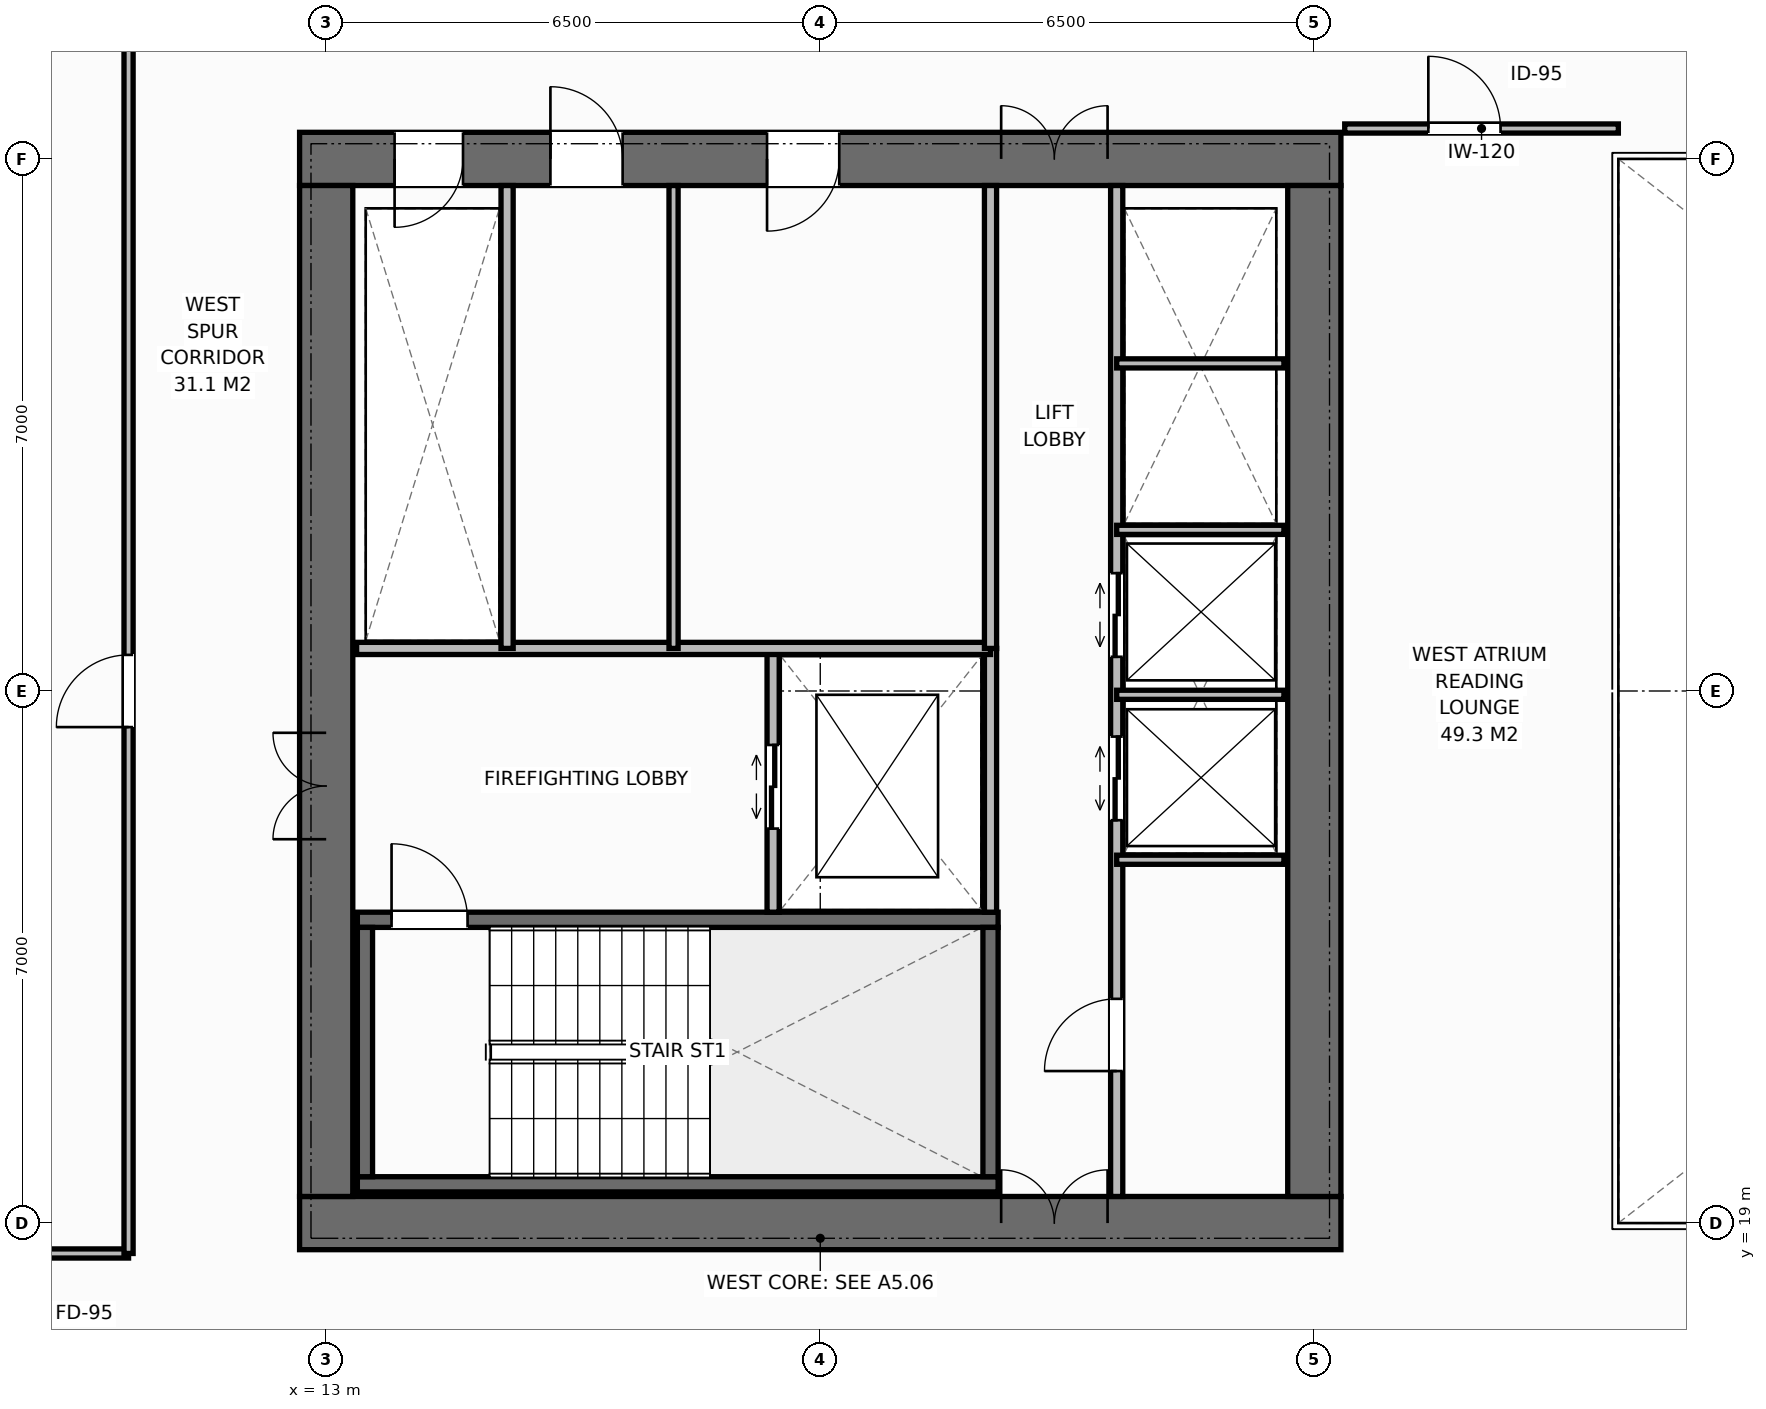
"""IFC4 building model, lengths in metres.
Left out: names, types, materials, properties, quantities, classifications, styles, units other than length and angle.
Written with IfcOpenShell. Run it as: python <this file> out.ifc"""

import sys

from ifc_helpers import new_model, si_unit, direction, frame, frame_2d, origin, place, context, subcontext, project, spatial, rectangle, extrude, element, fill, save


model = new_model("IFC4")
c1 = context("Model", 3, precision=1e-05, world=origin(), true_north=direction((0.0, 1.0)))
c2 = subcontext(c1, "Body", "Model", "MODEL_VIEW")
j1 = project(units=[si_unit("LENGTHUNIT", "METRE"), si_unit("PLANEANGLEUNIT", "RADIAN")], contexts=[c1])
p1 = place(None, origin())
s1 = spatial("IfcSite", under=j1, at=p1, CompositionType="ELEMENT")
p2 = place(p1, origin())
s2 = spatial("IfcBuilding", under=s1, at=p2, CompositionType="ELEMENT")
p3 = place(p2, frame((0.0, 0.0, 93.6)))
s3 = spatial("IfcBuildingStorey", under=s2, at=p3, CompositionType="ELEMENT", Elevation=93.6)
p4 = place(p3, frame((12.65, 19.0, 0.0), z_axis=(0.0, 0.0, 1.0), x_axis=(1.0, 0.0, 0.0)))
e1 = element("IfcWall", 1, at=p4, inside=s3, PredefinedType="SHEAR", context=c2, shape_type="SweptSolid", body=[
    extrude(rectangle(XDim=13.7, YDim=0.7, at=frame_2d((6.85, 0.0))), origin(), (0.0, 0.0, 1.0), 3.8),
])
p5 = place(p4, frame((9.23, 0.0, 0.0)))
e2 = element("IfcOpeningElement", 2, at=p5, cuts=e1, PredefinedType="OPENING", context=c2, shape_type="SweptSolid", body=[
    extrude(rectangle(XDim=1.4, YDim=2.2, at=frame_2d((0.7, 1.1))), frame((0.0, 0.36, 0.0), z_axis=(0.0, -1.0, 0.0), x_axis=(1.0, 0.0, 0.0)), (0.0, 0.0, 1.0), 0.72),
])
p6 = place(p3, frame((12.65, 33.0, 0.0), z_axis=(0.0, 0.0, 1.0), x_axis=(1.0, 0.0, 0.0)))
e3 = element("IfcWall", 3, at=p6, inside=s3, PredefinedType="SHEAR", context=c2, shape_type="SweptSolid", body=[
    extrude(rectangle(XDim=13.7, YDim=0.7, at=frame_2d((6.85, 0.0))), origin(), (0.0, 0.0, 1.0), 3.8),
])
p7 = place(p6, frame((1.25, 0.0, 0.0)))
e4 = element("IfcOpeningElement", 4, at=p7, cuts=e3, PredefinedType="OPENING", context=c2, shape_type="SweptSolid", body=[
    extrude(rectangle(XDim=0.9, YDim=2.15, at=frame_2d((0.45, 1.075))), frame((0.0, 0.36, 0.0), z_axis=(0.0, -1.0, 0.0), x_axis=(1.0, 0.0, 0.0)), (0.0, 0.0, 1.0), 0.72),
])
p8 = place(p6, frame((3.3, 0.0, 0.0)))
e5 = element("IfcOpeningElement", 5, at=p8, cuts=e3, PredefinedType="OPENING", context=c2, shape_type="SweptSolid", body=[
    extrude(rectangle(XDim=0.95, YDim=2.15, at=frame_2d((0.475, 1.075))), frame((0.0, 0.36, 0.0), z_axis=(0.0, -1.0, 0.0), x_axis=(1.0, 0.0, 0.0)), (0.0, 0.0, 1.0), 0.72),
])
p9 = place(p6, frame((6.15, 0.0, 0.0)))
e6 = element("IfcOpeningElement", 6, at=p9, cuts=e3, PredefinedType="OPENING", context=c2, shape_type="SweptSolid", body=[
    extrude(rectangle(XDim=0.95, YDim=2.15, at=frame_2d((0.475, 1.075))), frame((0.0, 0.36, 0.0), z_axis=(0.0, -1.0, 0.0), x_axis=(1.0, 0.0, 0.0)), (0.0, 0.0, 1.0), 0.72),
])
p10 = place(p6, frame((9.23, 0.0, 0.0)))
e7 = element("IfcOpeningElement", 7, at=p10, cuts=e3, PredefinedType="OPENING", context=c2, shape_type="SweptSolid", body=[
    extrude(rectangle(XDim=1.4, YDim=2.2, at=frame_2d((0.7, 1.1))), frame((0.0, 0.36, 0.0), z_axis=(0.0, -1.0, 0.0), x_axis=(1.0, 0.0, 0.0)), (0.0, 0.0, 1.0), 0.72),
])
p11 = place(p3, frame((13.0, 19.35, 0.0), z_axis=(0.0, 0.0, 1.0), x_axis=(0.0, 1.0, 0.0)))
e8 = element("IfcWall", 8, at=p11, inside=s3, PredefinedType="SHEAR", context=c2, shape_type="SweptSolid", body=[
    extrude(rectangle(XDim=13.3, YDim=0.7, at=frame_2d((6.65, 0.0))), origin(), (0.0, 0.0, 1.0), 3.8),
])
p12 = place(p11, frame((4.7, 0.0, 0.0)))
e9 = element("IfcOpeningElement", 9, at=p12, cuts=e8, PredefinedType="OPENING", context=c2, shape_type="SweptSolid", body=[
    extrude(rectangle(XDim=1.4, YDim=2.2, at=frame_2d((0.7, 1.1))), frame((0.0, 0.36, 0.0), z_axis=(0.0, -1.0, 0.0), x_axis=(1.0, 0.0, 0.0)), (0.0, 0.0, 1.0), 0.72),
])
p13 = place(p3, frame((26.0, 19.35, 0.0), z_axis=(0.0, 0.0, 1.0), x_axis=(0.0, 1.0, 0.0)))
e10 = element("IfcWall", 10, at=p13, inside=s3, PredefinedType="SHEAR", context=c2, shape_type="SweptSolid", body=[
    extrude(rectangle(XDim=13.3, YDim=0.7, at=frame_2d((6.65, 0.0))), origin(), (0.0, 0.0, 1.0), 3.8),
])
p14 = place(p3, frame((13.41, 19.51, 0.0), z_axis=(0.0, 0.0, 1.0), x_axis=(1.0, 0.0, 0.0)))
e11 = element("IfcWall", 11, at=p14, inside=s3, PredefinedType="SHEAR", context=c2, shape_type="SweptSolid", body=[
    extrude(rectangle(XDim=8.43, YDim=0.2, at=frame_2d((4.215, 0.0))), origin(), (0.0, 0.0, 1.0), 3.8),
])
p15 = place(p3, frame((13.41, 22.99, 0.0), z_axis=(0.0, 0.0, 1.0), x_axis=(1.0, 0.0, 0.0)))
e12 = element("IfcWall", 12, at=p15, inside=s3, PredefinedType="SHEAR", context=c2, shape_type="SweptSolid", body=[
    extrude(rectangle(XDim=8.43, YDim=0.2, at=frame_2d((4.215, 0.0))), origin(), (0.0, 0.0, 1.0), 3.8),
])
p16 = place(p15, frame((0.45, 0.0, 0.0)))
e13 = element("IfcOpeningElement", 13, at=p16, cuts=e12, PredefinedType="OPENING", context=c2, shape_type="SweptSolid", body=[
    extrude(rectangle(XDim=1.0, YDim=2.15, at=frame_2d((0.5, 1.075))), frame((0.0, 0.11, 0.0), z_axis=(0.0, -1.0, 0.0), x_axis=(1.0, 0.0, 0.0)), (0.0, 0.0, 1.0), 0.22),
])
for number, where, z_axis, x_axis in (
    (14, (13.51, 19.61, 0.0), (0.0, 0.0, 1.0), (0.0, 1.0, 0.0)),
    (15, (21.74, 19.61, 0.0), (0.0, 0.0, 1.0), (0.0, 1.0, 0.0)),
):
    element("IfcWall", number, at=place(p3, frame(where, z_axis=z_axis, x_axis=x_axis)), inside=s3, PredefinedType="SHEAR", context=c2, shape_type="SweptSolid", body=[
        extrude(rectangle(XDim=3.28, YDim=0.2, at=frame_2d((1.64, 0.0))), origin(), (0.0, 0.0, 1.0), 3.8),
    ])
p17 = place(p3, frame((21.74, 23.09, 0.0), z_axis=(0.0, 0.0, 1.0), x_axis=(0.0, 1.0, 0.0)))
e16 = element("IfcWall", 16, at=p17, inside=s3, PredefinedType="STANDARD", context=c2, shape_type="SweptSolid", body=[
    extrude(rectangle(XDim=3.47, YDim=0.16, at=frame_2d((1.735, 0.0))), origin(), (0.0, 0.0, 1.0), 3.565),
])
p18 = place(p3, frame((18.88, 23.09, 0.0), z_axis=(0.0, 0.0, 1.0), x_axis=(0.0, 1.0, 0.0)))
e17 = element("IfcWall", 17, at=p18, inside=s3, PredefinedType="STANDARD", context=c2, shape_type="SweptSolid", body=[
    extrude(rectangle(XDim=3.47, YDim=0.16, at=frame_2d((1.735, 0.0))), origin(), (0.0, 0.0, 1.0), 3.565),
])
p19 = place(p18, frame((1.1, 0.0, 0.0)))
e18 = element("IfcOpeningElement", 18, at=p19, cuts=e17, PredefinedType="OPENING", context=c2, shape_type="SweptSolid", body=[
    extrude(rectangle(XDim=1.1, YDim=2.2, at=frame_2d((0.55, 1.1))), frame((0.0, 0.09, 0.0), z_axis=(0.0, -1.0, 0.0), x_axis=(1.0, 0.0, 0.0)), (0.0, 0.0, 1.0), 0.18),
])
p20 = place(p3, frame((13.4, 26.56, 0.0), z_axis=(0.0, 0.0, 1.0), x_axis=(1.0, 0.0, 0.0)))
e19 = element("IfcWall", 19, at=p20, inside=s3, PredefinedType="STANDARD", context=c2, shape_type="SweptSolid", body=[
    extrude(rectangle(XDim=8.34, YDim=0.16, at=frame_2d((4.17, 0.0))), origin(), (0.0, 0.0, 1.0), 3.565),
])
p21 = place(p3, frame((15.38, 26.56, 0.0), z_axis=(0.0, 0.0, 1.0), x_axis=(0.0, 1.0, 0.0)))
e20 = element("IfcWall", 20, at=p21, inside=s3, PredefinedType="STANDARD", context=c2, shape_type="SweptSolid", body=[
    extrude(rectangle(XDim=6.09, YDim=0.16, at=frame_2d((3.045, 0.0))), origin(), (0.0, 0.0, 1.0), 3.565),
])
p22 = place(p3, frame((17.57, 26.56, 0.0), z_axis=(0.0, 0.0, 1.0), x_axis=(0.0, 1.0, 0.0)))
e21 = element("IfcWall", 21, at=p22, inside=s3, PredefinedType="PARTITIONING", context=c2, shape_type="SweptSolid", body=[
    extrude(rectangle(XDim=6.09, YDim=0.12, at=frame_2d((3.045, 0.0))), origin(), (0.0, 0.0, 1.0), 3.565),
])
p23 = place(p3, frame((21.74, 26.56, 0.0), z_axis=(0.0, 0.0, 1.0), x_axis=(0.0, 1.0, 0.0)))
e22 = element("IfcWall", 22, at=p23, inside=s3, PredefinedType="STANDARD", context=c2, shape_type="SweptSolid", body=[
    extrude(rectangle(XDim=6.09, YDim=0.16, at=frame_2d((3.045, 0.0))), origin(), (0.0, 0.0, 1.0), 3.565),
])
p24 = place(p3, frame((23.4, 19.35, 0.0), z_axis=(0.0, 0.0, 1.0), x_axis=(0.0, 1.0, 0.0)))
e23 = element("IfcWall", 23, at=p24, inside=s3, PredefinedType="STANDARD", context=c2, shape_type="SweptSolid", body=[
    extrude(rectangle(XDim=13.3, YDim=0.16, at=frame_2d((6.65, 0.0))), origin(), (0.0, 0.0, 1.0), 3.565),
])
p25 = place(p24, frame((1.65, 0.0, 0.0)))
e24 = element("IfcOpeningElement", 24, at=p25, cuts=e23, PredefinedType="OPENING", context=c2, shape_type="SweptSolid", body=[
    extrude(rectangle(XDim=0.95, YDim=2.15, at=frame_2d((0.475, 1.075))), frame((0.0, 0.09, 0.0), z_axis=(0.0, -1.0, 0.0), x_axis=(1.0, 0.0, 0.0)), (0.0, 0.0, 1.0), 0.18),
])
p26 = place(p24, frame((4.95, 0.0, 0.0)))
e25 = element("IfcOpeningElement", 25, at=p26, cuts=e23, PredefinedType="OPENING", context=c2, shape_type="SweptSolid", body=[
    extrude(rectangle(XDim=1.1, YDim=2.2, at=frame_2d((0.55, 1.1))), frame((0.0, 0.09, 0.0), z_axis=(0.0, -1.0, 0.0), x_axis=(1.0, 0.0, 0.0)), (0.0, 0.0, 1.0), 0.18),
])
p27 = place(p24, frame((7.1, 0.0, 0.0)))
e26 = element("IfcOpeningElement", 26, at=p27, cuts=e23, PredefinedType="OPENING", context=c2, shape_type="SweptSolid", body=[
    extrude(rectangle(XDim=1.1, YDim=2.2, at=frame_2d((0.55, 1.1))), frame((0.0, 0.09, 0.0), z_axis=(0.0, -1.0, 0.0), x_axis=(1.0, 0.0, 0.0)), (0.0, 0.0, 1.0), 0.18),
])
for number, where, z_axis, x_axis in (
    (27, (23.4, 23.78, 0.0), (0.0, 0.0, 1.0), (1.0, 0.0, 0.0)),
    (28, (23.4, 25.95, 0.0), (0.0, 0.0, 1.0), (1.0, 0.0, 0.0)),
    (29, (23.4, 28.12, 0.0), (0.0, 0.0, 1.0), (1.0, 0.0, 0.0)),
    (30, (23.4, 30.31, 0.0), (0.0, 0.0, 1.0), (1.0, 0.0, 0.0)),
):
    element("IfcWall", number, at=place(p3, frame(where, z_axis=z_axis, x_axis=x_axis)), inside=s3, PredefinedType="PARTITIONING", context=c2, shape_type="SweptSolid", body=[
        extrude(rectangle(XDim=2.2, YDim=0.12, at=frame_2d((1.1, 0.0))), origin(), (0.0, 0.0, 1.0), 3.565),
    ])
p28 = place(p3, frame((26.4, 33.4, 0.0), z_axis=(0.0, 0.0, 1.0), x_axis=(1.0, 0.0, 0.0)))
e31 = element("IfcWall", 31, at=p28, inside=s3, PredefinedType="PARTITIONING", context=c2, shape_type="SweptSolid", body=[
    extrude(rectangle(XDim=3.6, YDim=0.12, at=frame_2d((1.8, 0.0))), origin(), (0.0, 0.0, 1.0), 3.565),
])
p29 = place(p28, frame((1.1, 0.0, 0.0)))
e32 = element("IfcOpeningElement", 32, at=p29, cuts=e31, PredefinedType="OPENING", context=c2, shape_type="SweptSolid", body=[
    extrude(rectangle(XDim=0.95, YDim=2.15, at=frame_2d((0.475, 1.075))), frame((0.0, 0.07, 0.0), z_axis=(0.0, -1.0, 0.0), x_axis=(1.0, 0.0, 0.0)), (0.0, 0.0, 1.0), 0.14),
])
p30 = place(p3, frame((1.82, 18.6, 0.0), z_axis=(0.0, 0.0, 1.0), x_axis=(1.0, 0.0, 0.0)))
e33 = element("IfcWall", 33, at=p30, inside=s3, PredefinedType="PARTITIONING", context=c2, shape_type="SweptSolid", body=[
    extrude(rectangle(XDim=8.58, YDim=0.12, at=frame_2d((4.29, 0.0))), origin(), (0.0, 0.0, 1.0), 3.565),
])
p31 = place(p3, frame((10.4, 18.6, 0.0), z_axis=(0.0, 0.0, 1.0), x_axis=(0.0, 1.0, 0.0)))
e34 = element("IfcWall", 34, at=p31, inside=s3, PredefinedType="PARTITIONING", context=c2, shape_type="SweptSolid", body=[
    extrude(rectangle(XDim=16.9, YDim=0.12, at=frame_2d((8.45, 0.0))), origin(), (0.0, 0.0, 1.0), 3.565),
])
p32 = place(p31, frame((6.925, 0.0, 0.0)))
e35 = element("IfcOpeningElement", 35, at=p32, cuts=e34, PredefinedType="OPENING", context=c2, shape_type="SweptSolid", body=[
    extrude(rectangle(XDim=0.95, YDim=2.15, at=frame_2d((0.475, 1.075))), frame((0.0, 0.07, 0.0), z_axis=(0.0, -1.0, 0.0), x_axis=(1.0, 0.0, 0.0)), (0.0, 0.0, 1.0), 0.14),
])
p33 = place(p16, origin())
e36 = element("IfcDoor", 36, at=p33, inside=s3, OperationType="SINGLE_SWING_LEFT", PredefinedType="DOOR", context=c2, shape_type="SweptSolid", body=[
    extrude(rectangle(XDim=1.0, YDim=2.15, at=frame_2d((0.5, 1.075))), frame((0.0, 0.025, 0.0), z_axis=(0.0, -1.0, 0.0), x_axis=(1.0, 0.0, 0.0)), (0.0, 0.0, 1.0), 0.05),
])
fill(e13, e36)
p34 = place(p12, origin())
e37 = element("IfcDoor", 37, at=p34, inside=s3, OperationType="DOUBLE_DOOR_SINGLE_SWING", PredefinedType="DOOR", context=c2, shape_type="SweptSolid", body=[
    extrude(rectangle(XDim=1.4, YDim=2.2, at=frame_2d((0.7, 1.1))), frame((0.0, 0.025, 0.0), z_axis=(0.0, -1.0, 0.0), x_axis=(1.0, 0.0, 0.0)), (0.0, 0.0, 1.0), 0.05),
])
fill(e9, e37)
p35 = place(p19, origin())
e38 = element("IfcDoor", 38, at=p35, inside=s3, OperationType="DOUBLE_DOOR_SLIDING", PredefinedType="DOOR", context=c2, shape_type="SweptSolid", body=[
    extrude(rectangle(XDim=1.1, YDim=2.2, at=frame_2d((0.55, 1.1))), frame((0.0, 0.025, 0.0), z_axis=(0.0, -1.0, 0.0), x_axis=(1.0, 0.0, 0.0)), (0.0, 0.0, 1.0), 0.05),
])
fill(e18, e38)
p36 = place(p7, origin())
e39 = element("IfcDoor", 39, at=p36, inside=s3, OperationType="SINGLE_SWING_RIGHT", PredefinedType="DOOR", context=c2, shape_type="SweptSolid", body=[
    extrude(rectangle(XDim=0.9, YDim=2.15, at=frame_2d((0.45, 1.075))), frame((0.0, -0.075, 0.0), z_axis=(0.0, -1.0, 0.0), x_axis=(1.0, 0.0, 0.0)), (0.0, 0.0, 1.0), 0.05),
])
fill(e4, e39)
p37 = place(p8, origin())
e40 = element("IfcDoor", 40, at=p37, inside=s3, OperationType="SINGLE_SWING_LEFT", PredefinedType="DOOR", context=c2, shape_type="SweptSolid", body=[
    extrude(rectangle(XDim=0.95, YDim=2.15, at=frame_2d((0.475, 1.075))), frame((0.0, -0.075, 0.0), z_axis=(0.0, -1.0, 0.0), x_axis=(1.0, 0.0, 0.0)), (0.0, 0.0, 1.0), 0.05),
])
fill(e5, e40)
p38 = place(p9, origin())
e41 = element("IfcDoor", 41, at=p38, inside=s3, OperationType="SINGLE_SWING_RIGHT", PredefinedType="DOOR", context=c2, shape_type="SweptSolid", body=[
    extrude(rectangle(XDim=0.95, YDim=2.15, at=frame_2d((0.475, 1.075))), frame((0.0, -0.075, 0.0), z_axis=(0.0, -1.0, 0.0), x_axis=(1.0, 0.0, 0.0)), (0.0, 0.0, 1.0), 0.05),
])
fill(e6, e41)
p39 = place(p5, origin())
e42 = element("IfcDoor", 42, at=p39, inside=s3, OperationType="DOUBLE_DOOR_SINGLE_SWING", PredefinedType="DOOR", context=c2, shape_type="SweptSolid", body=[
    extrude(rectangle(XDim=1.4, YDim=2.2, at=frame_2d((0.7, 1.1))), frame((0.0, 0.125, 0.0), z_axis=(0.0, -1.0, 0.0), x_axis=(1.0, 0.0, 0.0)), (0.0, 0.0, 1.0), 0.05),
])
fill(e2, e42)
p40 = place(p10, origin())
e43 = element("IfcDoor", 43, at=p40, inside=s3, OperationType="DOUBLE_DOOR_SINGLE_SWING", PredefinedType="DOOR", context=c2, shape_type="SweptSolid", body=[
    extrude(rectangle(XDim=1.4, YDim=2.2, at=frame_2d((0.7, 1.1))), frame((0.0, -0.075, 0.0), z_axis=(0.0, -1.0, 0.0), x_axis=(1.0, 0.0, 0.0)), (0.0, 0.0, 1.0), 0.05),
])
fill(e7, e43)
p41 = place(p25, origin())
e44 = element("IfcDoor", 44, at=p41, inside=s3, OperationType="SINGLE_SWING_LEFT", PredefinedType="DOOR", context=c2, shape_type="SweptSolid", body=[
    extrude(rectangle(XDim=0.95, YDim=2.15, at=frame_2d((0.475, 1.075))), frame((0.0, 0.025, 0.0), z_axis=(0.0, -1.0, 0.0), x_axis=(1.0, 0.0, 0.0)), (0.0, 0.0, 1.0), 0.05),
])
fill(e24, e44)
p42 = place(p26, origin())
e45 = element("IfcDoor", 45, at=p42, inside=s3, OperationType="DOUBLE_DOOR_SLIDING", PredefinedType="DOOR", context=c2, shape_type="SweptSolid", body=[
    extrude(rectangle(XDim=1.1, YDim=2.2, at=frame_2d((0.55, 1.1))), frame((0.0, 0.025, 0.0), z_axis=(0.0, -1.0, 0.0), x_axis=(1.0, 0.0, 0.0)), (0.0, 0.0, 1.0), 0.05),
])
fill(e25, e45)
p43 = place(p27, origin())
e46 = element("IfcDoor", 46, at=p43, inside=s3, OperationType="DOUBLE_DOOR_SLIDING", PredefinedType="DOOR", context=c2, shape_type="SweptSolid", body=[
    extrude(rectangle(XDim=1.1, YDim=2.2, at=frame_2d((0.55, 1.1))), frame((0.0, 0.025, 0.0), z_axis=(0.0, -1.0, 0.0), x_axis=(1.0, 0.0, 0.0)), (0.0, 0.0, 1.0), 0.05),
])
fill(e26, e46)
p44 = place(p29, origin())
e47 = element("IfcDoor", 47, at=p44, inside=s3, OperationType="SINGLE_SWING_LEFT", PredefinedType="DOOR", context=c2, shape_type="SweptSolid", body=[
    extrude(rectangle(XDim=0.95, YDim=2.15, at=frame_2d((0.475, 1.075))), frame((0.0, 0.025, 0.0), z_axis=(0.0, -1.0, 0.0), x_axis=(1.0, 0.0, 0.0)), (0.0, 0.0, 1.0), 0.05),
])
fill(e32, e47)
p45 = place(p32, origin())
e48 = element("IfcDoor", 48, at=p45, inside=s3, OperationType="SINGLE_SWING_LEFT", PredefinedType="DOOR", context=c2, shape_type="SweptSolid", body=[
    extrude(rectangle(XDim=0.95, YDim=2.15, at=frame_2d((0.475, 1.075))), frame((0.0, 0.025, 0.0), z_axis=(0.0, -1.0, 0.0), x_axis=(1.0, 0.0, 0.0)), (0.0, 0.0, 1.0), 0.05),
])
fill(e35, e48)
save(model, sys.argv[1])
